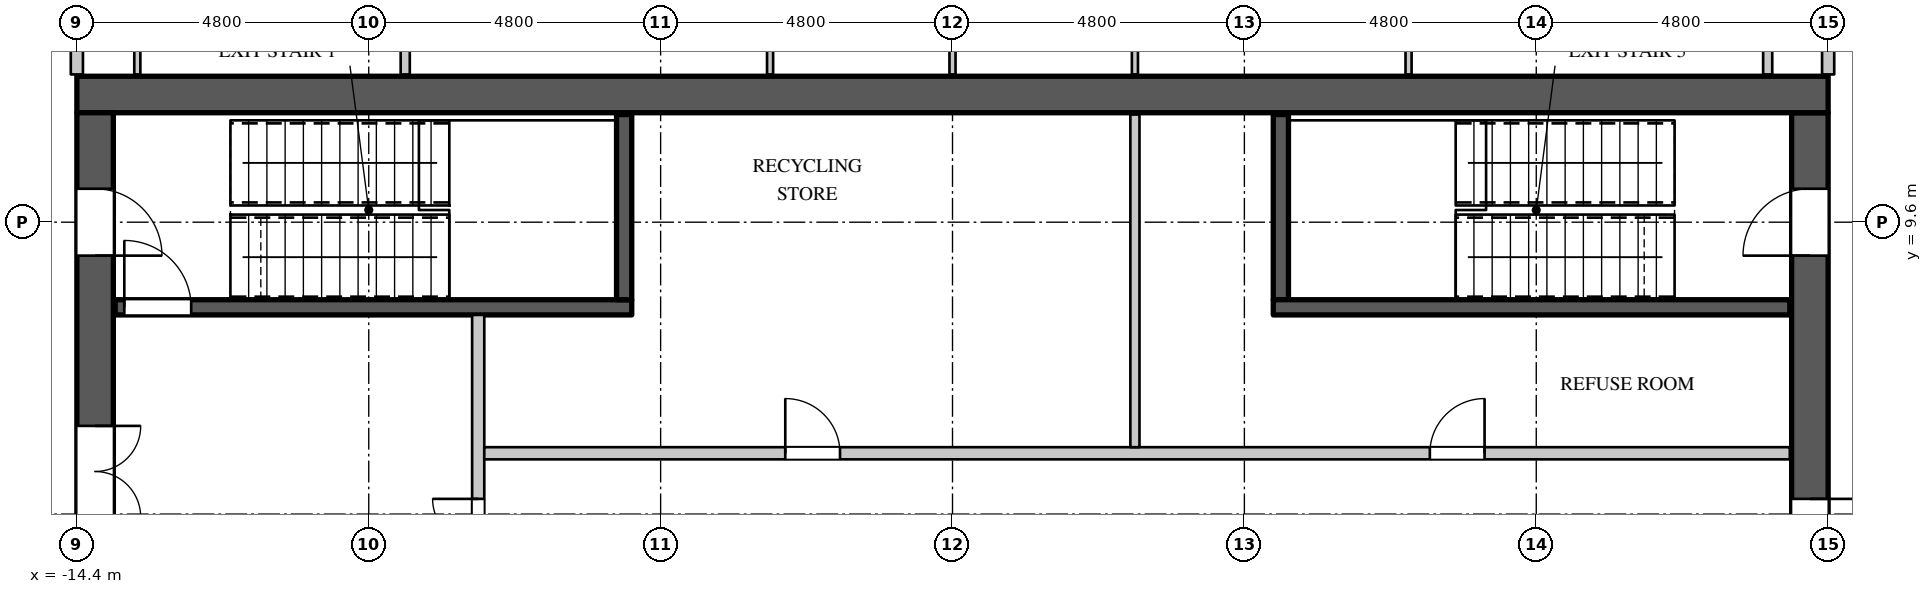
"""IFC4 building model, lengths in metres.
Left out: names, types, materials, properties, quantities, classifications, styles, units other than length and angle.
Written with IfcOpenShell. Run it as: python <this file> out.ifc"""

import sys

from ifc_helpers import new_model, si_unit, direction, frame, frame_2d, origin, place, context, subcontext, project, spatial, rectangle, extrude, element, fill, save


model = new_model("IFC4")
c1 = context("Model", 3, precision=1e-05, world=origin(), true_north=direction((0.0, 1.0)))
c2 = subcontext(c1, "Body", "Model", "MODEL_VIEW")
j1 = project(units=[si_unit("LENGTHUNIT", "METRE"), si_unit("PLANEANGLEUNIT", "RADIAN")], contexts=[c1])
p1 = place(None, origin())
s1 = spatial("IfcSite", under=j1, at=p1, CompositionType="ELEMENT")
p2 = place(p1, origin())
s2 = spatial("IfcBuilding", under=s1, at=p2, CompositionType="ELEMENT")
p3 = place(p2, frame((0.0, 0.0, 218.1)))
s3 = spatial("IfcBuildingStorey", under=s2, at=p3, CompositionType="ELEMENT", Elevation=218.1)
p4 = place(p3, frame((-14.4, 11.7, 0.0), z_axis=(0.0, 0.0, 1.0), x_axis=(1.0, 0.0, 0.0)))
e1 = element("IfcWall", 1, at=p4, inside=s3, PredefinedType="SHEAR", context=c2, shape_type="SweptSolid", body=[
    extrude(rectangle(XDim=28.8, YDim=0.6, at=frame_2d((14.4, 0.0))), origin(), (0.0, 0.0, 1.0), 4.2),
])
p5 = place(p3, frame((14.1, -11.4, 0.0), z_axis=(0.0, 0.0, 1.0), x_axis=(0.0, 1.0, 0.0)))
e2 = element("IfcWall", 2, at=p5, inside=s3, PredefinedType="SHEAR", context=c2, shape_type="SweptSolid", body=[
    extrude(rectangle(XDim=22.8, YDim=0.6, at=frame_2d((11.4, 0.0))), origin(), (0.0, 0.0, 1.0), 4.2),
])
p6 = place(p5, frame((20.45, 0.0, 0.0)))
e3 = element("IfcOpeningElement", 3, at=p6, cuts=e2, PredefinedType="OPENING", context=c2, shape_type="SweptSolid", body=[
    extrude(rectangle(XDim=1.1, YDim=2.2, at=frame_2d((0.55, 1.1))), frame((0.0, 0.31, 0.0), z_axis=(0.0, -1.0, 0.0), x_axis=(1.0, 0.0, 0.0)), (0.0, 0.0, 1.0), 0.62),
])
p7 = place(p5, frame((1.25, 0.0, 0.0)))
e4 = element("IfcOpeningElement", 4, at=p7, cuts=e2, PredefinedType="OPENING", context=c2, shape_type="SweptSolid", body=[
    extrude(rectangle(XDim=1.1, YDim=2.2, at=frame_2d((0.55, 1.1))), frame((0.0, 0.31, 0.0), z_axis=(0.0, -1.0, 0.0), x_axis=(1.0, 0.0, 0.0)), (0.0, 0.0, 1.0), 0.62),
])
p8 = place(p5, frame((14.95, 0.0, 0.0)))
e5 = element("IfcOpeningElement", 5, at=p8, cuts=e2, PredefinedType="OPENING", context=c2, shape_type="SweptSolid", body=[
    extrude(rectangle(XDim=1.5, YDim=2.4, at=frame_2d((0.75, 1.2))), frame((0.0, 0.31, 0.0), z_axis=(0.0, -1.0, 0.0), x_axis=(1.0, 0.0, 0.0)), (0.0, 0.0, 1.0), 0.62),
])
p9 = place(p5, frame((6.35, 0.0, 0.0)))
e6 = element("IfcOpeningElement", 6, at=p9, cuts=e2, PredefinedType="OPENING", context=c2, shape_type="SweptSolid", body=[
    extrude(rectangle(XDim=1.5, YDim=2.4, at=frame_2d((0.75, 1.2))), frame((0.0, 0.31, 0.0), z_axis=(0.0, -1.0, 0.0), x_axis=(1.0, 0.0, 0.0)), (0.0, 0.0, 1.0), 0.62),
])
p10 = place(p3, frame((-14.1, -11.4, 0.0), z_axis=(0.0, 0.0, 1.0), x_axis=(0.0, 1.0, 0.0)))
e7 = element("IfcWall", 7, at=p10, inside=s3, PredefinedType="SHEAR", context=c2, shape_type="SweptSolid", body=[
    extrude(rectangle(XDim=22.8, YDim=0.6, at=frame_2d((11.4, 0.0))), origin(), (0.0, 0.0, 1.0), 4.2),
])
p11 = place(p10, frame((20.45, 0.0, 0.0)))
e8 = element("IfcOpeningElement", 8, at=p11, cuts=e7, PredefinedType="OPENING", context=c2, shape_type="SweptSolid", body=[
    extrude(rectangle(XDim=1.1, YDim=2.2, at=frame_2d((0.55, 1.1))), frame((0.0, 0.31, 0.0), z_axis=(0.0, -1.0, 0.0), x_axis=(1.0, 0.0, 0.0)), (0.0, 0.0, 1.0), 0.62),
])
p12 = place(p10, frame((1.25, 0.0, 0.0)))
e9 = element("IfcOpeningElement", 9, at=p12, cuts=e7, PredefinedType="OPENING", context=c2, shape_type="SweptSolid", body=[
    extrude(rectangle(XDim=1.1, YDim=2.2, at=frame_2d((0.55, 1.1))), frame((0.0, 0.31, 0.0), z_axis=(0.0, -1.0, 0.0), x_axis=(1.0, 0.0, 0.0)), (0.0, 0.0, 1.0), 0.62),
])
p13 = place(p10, frame((16.15, 0.0, 0.0)))
e10 = element("IfcOpeningElement", 10, at=p13, cuts=e7, PredefinedType="OPENING", context=c2, shape_type="SweptSolid", body=[
    extrude(rectangle(XDim=1.5, YDim=2.4, at=frame_2d((0.75, 1.2))), frame((0.0, 0.31, 0.0), z_axis=(0.0, -1.0, 0.0), x_axis=(1.0, 0.0, 0.0)), (0.0, 0.0, 1.0), 0.62),
])
p14 = place(p10, frame((5.15, 0.0, 0.0)))
e11 = element("IfcOpeningElement", 11, at=p14, cuts=e7, PredefinedType="OPENING", context=c2, shape_type="SweptSolid", body=[
    extrude(rectangle(XDim=1.5, YDim=2.4, at=frame_2d((0.75, 1.2))), frame((0.0, 0.31, 0.0), z_axis=(0.0, -1.0, 0.0), x_axis=(1.0, 0.0, 0.0)), (0.0, 0.0, 1.0), 0.62),
])
p15 = place(p3, frame((-14.4, 12.03, 0.0), z_axis=(0.0, 0.0, 1.0), x_axis=(0.0, 1.0, 0.0)))
e12 = element("IfcWall", 12, at=p15, inside=s3, PredefinedType="PARTITIONING", context=c2, shape_type="SweptSolid", body=[
    extrude(rectangle(XDim=2.27, YDim=0.2, at=frame_2d((1.135, 0.0))), origin(), (0.0, 0.0, 1.0), 3.95),
])
p16 = place(p3, frame((-7.8, 2.8, 0.0), z_axis=(0.0, 0.0, 1.0), x_axis=(0.0, 1.0, 0.0)))
e13 = element("IfcWall", 13, at=p16, inside=s3, PredefinedType="PARTITIONING", context=c2, shape_type="SweptSolid", body=[
    extrude(rectangle(XDim=5.275, YDim=0.2, at=frame_2d((2.637, 0.0))), origin(), (0.0, 0.0, 1.0), 3.95),
])
p17 = place(p16, frame((0.75, 0.0, 0.0)))
e14 = element("IfcOpeningElement", 14, at=p17, cuts=e13, PredefinedType="OPENING", context=c2, shape_type="SweptSolid", body=[
    extrude(rectangle(XDim=1.5, YDim=2.4, at=frame_2d((0.75, 1.2))), frame((0.0, 0.11, 0.0), z_axis=(0.0, -1.0, 0.0), x_axis=(1.0, 0.0, 0.0)), (0.0, 0.0, 1.0), 0.22),
])
p18 = place(p3, frame((-7.7, 5.8, 0.0), z_axis=(0.0, 0.0, 1.0), x_axis=(1.0, 0.0, 0.0)))
e15 = element("IfcWall", 15, at=p18, inside=s3, PredefinedType="PARTITIONING", context=c2, shape_type="SweptSolid", body=[
    extrude(rectangle(XDim=21.47, YDim=0.2, at=frame_2d((10.735, 0.0))), origin(), (0.0, 0.0, 1.0), 3.95),
])
p19 = place(p18, frame((4.95, 0.0, 0.0)))
e16 = element("IfcOpeningElement", 16, at=p19, cuts=e15, PredefinedType="OPENING", context=c2, shape_type="SweptSolid", body=[
    extrude(rectangle(XDim=0.9, YDim=2.2, at=frame_2d((0.45, 1.1))), frame((0.0, 0.11, 0.0), z_axis=(0.0, -1.0, 0.0), x_axis=(1.0, 0.0, 0.0)), (0.0, 0.0, 1.0), 0.22),
])
p20 = place(p18, frame((15.55, 0.0, 0.0)))
e17 = element("IfcOpeningElement", 17, at=p20, cuts=e15, PredefinedType="OPENING", context=c2, shape_type="SweptSolid", body=[
    extrude(rectangle(XDim=0.9, YDim=2.2, at=frame_2d((0.45, 1.1))), frame((0.0, 0.11, 0.0), z_axis=(0.0, -1.0, 0.0), x_axis=(1.0, 0.0, 0.0)), (0.0, 0.0, 1.0), 0.22),
])
p21 = place(p3, frame((14.4, 12.03, 0.0), z_axis=(0.0, 0.0, 1.0), x_axis=(0.0, 1.0, 0.0)))
e18 = element("IfcWall", 18, at=p21, inside=s3, PredefinedType="PARTITIONING", context=c2, shape_type="SweptSolid", body=[
    extrude(rectangle(XDim=2.27, YDim=0.2, at=frame_2d((1.135, 0.0))), origin(), (0.0, 0.0, 1.0), 3.95),
])
p22 = place(p3, frame((-9.0, 12.03, 0.0), z_axis=(0.0, 0.0, 1.0), x_axis=(0.0, 1.0, 0.0)))
e19 = element("IfcWall", 19, at=p22, inside=s3, PredefinedType="PARTITIONING", context=c2, shape_type="SweptSolid", body=[
    extrude(rectangle(XDim=6.395, YDim=0.15, at=frame_2d((3.198, 0.0))), origin(), (0.0, 0.0, 1.0), 3.95),
])
p23 = place(p3, frame((3.0, 5.9, 0.0), z_axis=(0.0, 0.0, 1.0), x_axis=(0.0, 1.0, 0.0)))
e20 = element("IfcWall", 20, at=p23, inside=s3, PredefinedType="PARTITIONING", context=c2, shape_type="SweptSolid", body=[
    extrude(rectangle(XDim=5.47, YDim=0.15, at=frame_2d((2.735, 0.0))), origin(), (0.0, 0.0, 1.0), 3.95),
])
p24 = place(p3, frame((13.406, 12.03, 0.0), z_axis=(0.0, 0.0, 1.0), x_axis=(0.0, 1.0, 0.0)))
e21 = element("IfcWall", 21, at=p24, inside=s3, PredefinedType="PARTITIONING", context=c2, shape_type="SweptSolid", body=[
    extrude(rectangle(XDim=13.701, YDim=0.15, at=frame_2d((6.851, 0.0))), origin(), (0.0, 0.0, 1.0), 3.3),
])
p25 = place(p24, frame((2.5, 0.0, 0.0)))
e22 = element("IfcOpeningElement", 22, at=p25, cuts=e21, PredefinedType="OPENING", context=c2, shape_type="SweptSolid", body=[
    extrude(rectangle(XDim=1.5, YDim=2.2, at=frame_2d((0.75, 1.1))), frame((0.0, 0.085, 0.0), z_axis=(0.0, -1.0, 0.0), x_axis=(1.0, 0.0, 0.0)), (0.0, 0.0, 1.0), 0.17),
])
p26 = place(p3, frame((-13.77, 8.2, 0.0), z_axis=(0.0, 0.0, 1.0), x_axis=(1.0, 0.0, 0.0)))
e23 = element("IfcWall", 23, at=p26, inside=s3, PredefinedType="SHEAR", context=c2, shape_type="SweptSolid", body=[
    extrude(rectangle(XDim=8.495, YDim=0.25, at=frame_2d((4.248, 0.0))), origin(), (0.0, 0.0, 1.0), 3.95),
])
p27 = place(p26, frame((0.15, 0.0, 0.0)))
e24 = element("IfcOpeningElement", 24, at=p27, cuts=e23, PredefinedType="OPENING", context=c2, shape_type="SweptSolid", body=[
    extrude(rectangle(XDim=1.1, YDim=2.2, at=frame_2d((0.55, 1.1))), frame((0.0, 0.135, 0.0), z_axis=(0.0, -1.0, 0.0), x_axis=(1.0, 0.0, 0.0)), (0.0, 0.0, 1.0), 0.27),
])
for number, where, z_axis, x_axis in (
    (25, (-5.4, 8.325, 0.0), (0.0, 0.0, 1.0), (0.0, 1.0, 0.0)),
    (26, (5.4, 8.325, 0.0), (0.0, 0.0, 1.0), (0.0, 1.0, 0.0)),
):
    element("IfcWall", number, at=place(p3, frame(where, z_axis=z_axis, x_axis=x_axis)), inside=s3, PredefinedType="SHEAR", context=c2, shape_type="SweptSolid", body=[
        extrude(rectangle(XDim=3.045, YDim=0.25, at=frame_2d((1.522, 0.0))), origin(), (0.0, 0.0, 1.0), 3.95),
    ])
p28 = place(p3, frame((5.275, 8.2, 0.0), z_axis=(0.0, 0.0, 1.0), x_axis=(1.0, 0.0, 0.0)))
e27 = element("IfcWall", 27, at=p28, inside=s3, PredefinedType="SHEAR", context=c2, shape_type="SweptSolid", body=[
    extrude(rectangle(XDim=8.495, YDim=0.25, at=frame_2d((4.248, 0.0))), origin(), (0.0, 0.0, 1.0), 3.95),
])
p29 = place(p3, frame((-13.406, 12.03, 0.0), z_axis=(0.0, 0.0, 1.0), x_axis=(0.0, 1.0, 0.0)))
e28 = element("IfcWall", 28, at=p29, inside=s3, PredefinedType="PARTITIONING", context=c2, shape_type="SweptSolid", body=[
    extrude(rectangle(XDim=4.57, YDim=0.1, at=frame_2d((2.285, 0.0))), origin(), (0.0, 0.0, 1.0), 3.3),
])
p30 = place(p3, frame((-3.0, 12.03, 0.0), z_axis=(0.0, 0.0, 1.0), x_axis=(0.0, 1.0, 0.0)))
e29 = element("IfcWall", 29, at=p30, inside=s3, PredefinedType="PARTITIONING", context=c2, shape_type="SweptSolid", body=[
    extrude(rectangle(XDim=6.42, YDim=0.1, at=frame_2d((3.21, 0.0))), origin(), (0.0, 0.0, 1.0), 3.95),
])
p31 = place(p30, frame((2.75, 0.0, 0.0)))
e30 = element("IfcOpeningElement", 30, at=p31, cuts=e29, PredefinedType="OPENING", context=c2, shape_type="SweptSolid", body=[
    extrude(rectangle(XDim=0.9, YDim=2.2, at=frame_2d((0.45, 1.1))), frame((0.0, 0.06, 0.0), z_axis=(0.0, -1.0, 0.0), x_axis=(1.0, 0.0, 0.0)), (0.0, 0.0, 1.0), 0.12),
])
p32 = place(p3, frame((0.0, 12.03, 0.0), z_axis=(0.0, 0.0, 1.0), x_axis=(0.0, 1.0, 0.0)))
e31 = element("IfcWall", 31, at=p32, inside=s3, PredefinedType="PARTITIONING", context=c2, shape_type="SweptSolid", body=[
    extrude(rectangle(XDim=6.395, YDim=0.1, at=frame_2d((3.198, 0.0))), origin(), (0.0, 0.0, 1.0), 3.95),
])
p33 = place(p32, frame((2.75, 0.0, 0.0)))
e32 = element("IfcOpeningElement", 32, at=p33, cuts=e31, PredefinedType="OPENING", context=c2, shape_type="SweptSolid", body=[
    extrude(rectangle(XDim=0.9, YDim=2.2, at=frame_2d((0.45, 1.1))), frame((0.0, 0.06, 0.0), z_axis=(0.0, -1.0, 0.0), x_axis=(1.0, 0.0, 0.0)), (0.0, 0.0, 1.0), 0.12),
])
p34 = place(p3, frame((3.0, 12.03, 0.0), z_axis=(0.0, 0.0, 1.0), x_axis=(0.0, 1.0, 0.0)))
e33 = element("IfcWall", 33, at=p34, inside=s3, PredefinedType="PARTITIONING", context=c2, shape_type="SweptSolid", body=[
    extrude(rectangle(XDim=6.42, YDim=0.1, at=frame_2d((3.21, 0.0))), origin(), (0.0, 0.0, 1.0), 3.95),
])
p35 = place(p3, frame((7.5, 12.03, 0.0), z_axis=(0.0, 0.0, 1.0), x_axis=(0.0, 1.0, 0.0)))
e34 = element("IfcWall", 34, at=p35, inside=s3, PredefinedType="PARTITIONING", context=c2, shape_type="SweptSolid", body=[
    extrude(rectangle(XDim=5.445, YDim=0.1, at=frame_2d((2.723, 0.0))), origin(), (0.0, 0.0, 1.0), 3.95),
])
p36 = place(p35, frame((2.25, 0.0, 0.0)))
e35 = element("IfcOpeningElement", 35, at=p36, cuts=e34, PredefinedType="OPENING", context=c2, shape_type="SweptSolid", body=[
    extrude(rectangle(XDim=0.9, YDim=2.2, at=frame_2d((0.45, 1.1))), frame((0.0, 0.06, 0.0), z_axis=(0.0, -1.0, 0.0), x_axis=(1.0, 0.0, 0.0)), (0.0, 0.0, 1.0), 0.12),
])
p37 = place(p19, origin())
e36 = element("IfcDoor", 36, at=p37, inside=s3, OperationType="SINGLE_SWING_LEFT", PredefinedType="DOOR", context=c2, shape_type="SweptSolid", body=[
    extrude(rectangle(XDim=0.9, YDim=2.2, at=frame_2d((0.45, 1.1))), frame((0.0, 0.025, 0.0), z_axis=(0.0, -1.0, 0.0), x_axis=(1.0, 0.0, 0.0)), (0.0, 0.0, 1.0), 0.05),
])
fill(e16, e36)
p38 = place(p20, origin())
e37 = element("IfcDoor", 37, at=p38, inside=s3, OperationType="SINGLE_SWING_RIGHT", PredefinedType="DOOR", context=c2, shape_type="SweptSolid", body=[
    extrude(rectangle(XDim=0.9, YDim=2.2, at=frame_2d((0.45, 1.1))), frame((0.0, 0.025, 0.0), z_axis=(0.0, -1.0, 0.0), x_axis=(1.0, 0.0, 0.0)), (0.0, 0.0, 1.0), 0.05),
])
fill(e17, e37)
p39 = place(p27, origin())
e38 = element("IfcDoor", 38, at=p39, inside=s3, OperationType="SINGLE_SWING_LEFT", PredefinedType="DOOR", context=c2, shape_type="SweptSolid", body=[
    extrude(rectangle(XDim=1.1, YDim=2.2, at=frame_2d((0.55, 1.1))), frame((0.0, 0.025, 0.0), z_axis=(0.0, -1.0, 0.0), x_axis=(1.0, 0.0, 0.0)), (0.0, 0.0, 1.0), 0.05),
])
fill(e24, e38)
p40 = place(p17, origin())
e39 = element("IfcDoor", 39, at=p40, inside=s3, OperationType="DOUBLE_DOOR_SINGLE_SWING", PredefinedType="DOOR", context=c2, shape_type="SweptSolid", body=[
    extrude(rectangle(XDim=1.5, YDim=2.4, at=frame_2d((0.75, 1.2))), frame((0.0, 0.025, 0.0), z_axis=(0.0, -1.0, 0.0), x_axis=(1.0, 0.0, 0.0)), (0.0, 0.0, 1.0), 0.05),
])
fill(e14, e39)
p41 = place(p11, origin())
e40 = element("IfcDoor", 40, at=p41, inside=s3, OperationType="SINGLE_SWING_RIGHT", PredefinedType="DOOR", context=c2, shape_type="SweptSolid", body=[
    extrude(rectangle(XDim=1.1, YDim=2.2, at=frame_2d((0.55, 1.1))), frame((0.0, -0.245, 0.0), z_axis=(0.0, -1.0, 0.0), x_axis=(1.0, 0.0, 0.0)), (0.0, 0.0, 1.0), 0.05),
])
fill(e8, e40)
p42 = place(p6, origin())
e41 = element("IfcDoor", 41, at=p42, inside=s3, OperationType="SINGLE_SWING_LEFT", PredefinedType="DOOR", context=c2, shape_type="SweptSolid", body=[
    extrude(rectangle(XDim=1.1, YDim=2.2, at=frame_2d((0.55, 1.1))), frame((0.0, 0.295, 0.0), z_axis=(0.0, -1.0, 0.0), x_axis=(1.0, 0.0, 0.0)), (0.0, 0.0, 1.0), 0.05),
])
fill(e3, e41)
p43 = place(p13, origin())
e42 = element("IfcDoor", 42, at=p43, inside=s3, OperationType="DOUBLE_DOOR_SINGLE_SWING", PredefinedType="DOOR", context=c2, shape_type="SweptSolid", body=[
    extrude(rectangle(XDim=1.5, YDim=2.4, at=frame_2d((0.75, 1.2))), frame((0.0, -0.245, 0.0), z_axis=(0.0, -1.0, 0.0), x_axis=(1.0, 0.0, 0.0)), (0.0, 0.0, 1.0), 0.05),
])
fill(e10, e42)
p44 = place(p8, origin())
e43 = element("IfcDoor", 43, at=p44, inside=s3, OperationType="DOUBLE_DOOR_SINGLE_SWING", PredefinedType="DOOR", context=c2, shape_type="SweptSolid", body=[
    extrude(rectangle(XDim=1.5, YDim=2.4, at=frame_2d((0.75, 1.2))), frame((0.0, -0.245, 0.0), z_axis=(0.0, -1.0, 0.0), x_axis=(1.0, 0.0, 0.0)), (0.0, 0.0, 1.0), 0.05),
])
fill(e5, e43)
save(model, sys.argv[1])
